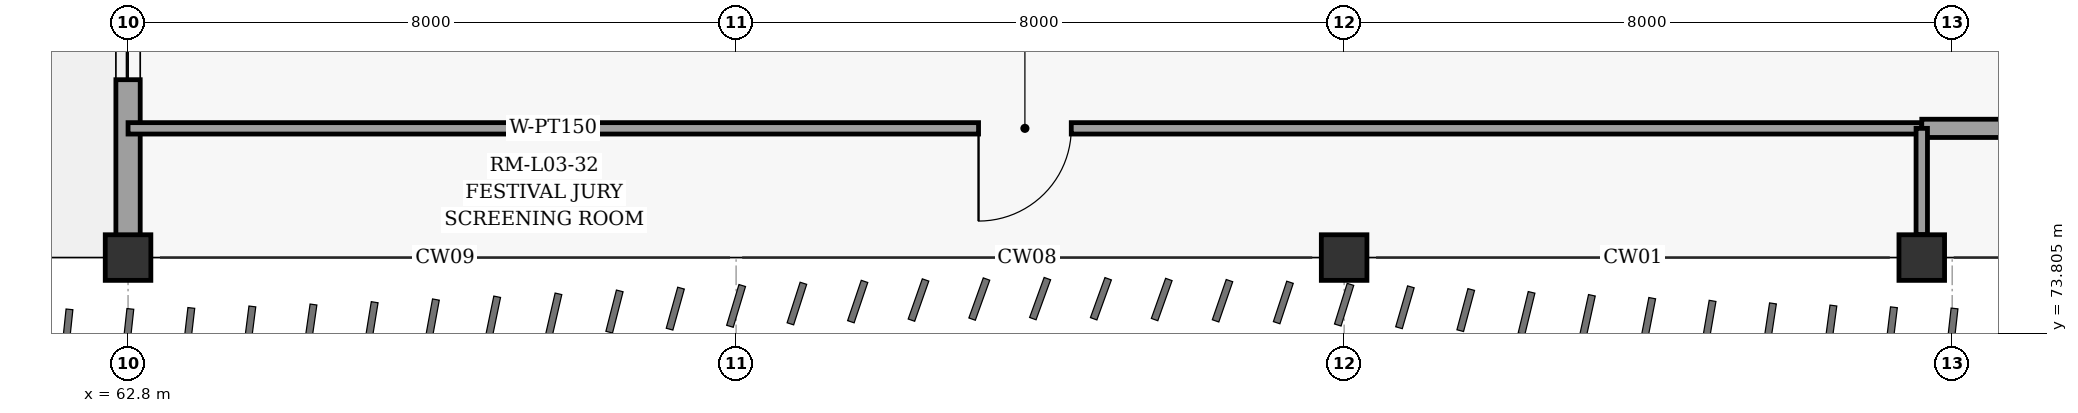
"""IFC4 building model, lengths in metres.
Left out: names, types, materials, properties, quantities, classifications, styles, units other than length and angle.
Written with IfcOpenShell. Run it as: python <this file> out.ifc"""

import sys

from ifc_helpers import new_model, si_unit, direction, frame, frame_2d, origin, origin_2d, place, context, subcontext, project, spatial, rectangle, extrude, element, fill, save


model = new_model("IFC4")
c1 = context("Model", 3, precision=1e-05, world=origin(), true_north=direction((0.0, 1.0)))
c2 = subcontext(c1, "Body", "Model", "MODEL_VIEW")
j1 = project(units=[si_unit("LENGTHUNIT", "METRE"), si_unit("PLANEANGLEUNIT", "RADIAN")], contexts=[c1])
p1 = place(None, origin())
s1 = spatial("IfcSite", under=j1, at=p1, CompositionType="ELEMENT")
p2 = place(p1, origin())
s2 = spatial("IfcBuilding", under=s1, at=p2, CompositionType="ELEMENT")
p3 = place(p2, frame((0.0, 0.0, 15.6)))
s3 = spatial("IfcBuildingStorey", under=s2, at=p3, CompositionType="ELEMENT", Elevation=15.6)
for number, where, z_axis, x_axis in (
    (1, (62.8, 74.8, 0.0), (0.0, 0.0, 1.0), (1.0, 0.0, 0.0)),
    (2, (78.8, 74.8, 0.0), (0.0, 0.0, 1.0), (1.0, 0.0, 0.0)),
    (3, (86.4, 74.8, 0.0), (0.0, 0.0, 1.0), (1.0, 0.0, 0.0)),
):
    element("IfcColumn", number, at=place(p3, frame(where, z_axis=z_axis, x_axis=x_axis)), inside=s3, PredefinedType="COLUMN", context=c2, shape_type="SweptSolid", body=[
        extrude(rectangle(XDim=0.6, YDim=0.6, at=origin_2d()), origin(), (0.0, 0.0, 1.0), 4.8),
    ])
p4 = place(p3, frame((62.8, 74.94, 0.0), z_axis=(0.0, 0.0, 1.0), x_axis=(0.0, 1.0, 0.0)))
e4 = element("IfcWall", 4, at=p4, inside=s3, PredefinedType="SOLIDWALL", context=c2, shape_type="SweptSolid", body=[
    extrude(rectangle(XDim=12.52, YDim=0.32, at=frame_2d((6.26, 0.0))), origin(), (0.0, 0.0, 1.0), 3.73),
])
p5 = place(p4, frame((2.2, 0.0, 0.8)))
e5 = element("IfcOpeningElement", 5, at=p5, cuts=e4, PredefinedType="OPENING", context=c2, shape_type="SweptSolid", body=[
    extrude(rectangle(XDim=1.7, YDim=2.15, at=frame_2d((0.85, 1.075))), frame((0.0, 0.17, 0.0), z_axis=(0.0, -1.0, 0.0), x_axis=(1.0, 0.0, 0.0)), (0.0, 0.0, 1.0), 0.34),
])
p6 = place(p3, frame((86.4, 76.5, 0.0), z_axis=(0.0, 0.0, 1.0), x_axis=(-1.0, 0.0, 0.0)))
e6 = element("IfcWall", 6, at=p6, inside=s3, PredefinedType="PARTITIONING", context=c2, shape_type="SweptSolid", body=[
    extrude(rectangle(XDim=23.6, YDim=0.15, at=frame_2d((11.8, 0.0))), origin(), (0.0, 0.0, 1.0), 4.58),
])
p7 = place(p6, frame((11.19, 0.0, 0.0)))
e7 = element("IfcOpeningElement", 7, at=p7, cuts=e6, PredefinedType="OPENING", context=c2, shape_type="SweptSolid", body=[
    extrude(rectangle(XDim=1.22, YDim=2.2, at=frame_2d((0.61, 1.1))), frame((0.0, 0.085, 0.0), z_axis=(0.0, -1.0, 0.0), x_axis=(1.0, 0.0, 0.0)), (0.0, 0.0, 1.0), 0.17),
])
p8 = place(p3, frame((126.8, 76.5, 0.0), z_axis=(0.0, 0.0, 1.0), x_axis=(-1.0, 0.0, 0.0)))
e8 = element("IfcWall", 8, at=p8, inside=s3, PredefinedType="PARTITIONING", context=c2, shape_type="SweptSolid", body=[
    extrude(rectangle(XDim=40.4, YDim=0.24, at=frame_2d((20.2, 0.0))), origin(), (0.0, 0.0, 1.0), 4.58),
])
p9 = place(p8, frame((19.57, 0.0, 0.0)))
e9 = element("IfcOpeningElement", 9, at=p9, cuts=e8, PredefinedType="OPENING", context=c2, shape_type="SweptSolid", body=[
    extrude(rectangle(XDim=1.26, YDim=2.2, at=frame_2d((0.63, 1.1))), frame((0.0, 0.13, 0.0), z_axis=(0.0, -1.0, 0.0), x_axis=(1.0, 0.0, 0.0)), (0.0, 0.0, 1.0), 0.26),
])
p10 = place(p3, frame((86.4, 76.5, 0.0), z_axis=(0.0, 0.0, 1.0), x_axis=(0.0, -1.0, 0.0)))
e10 = element("IfcWall", 10, at=p10, inside=s3, PredefinedType="PARTITIONING", context=c2, shape_type="SweptSolid", body=[
    extrude(rectangle(XDim=1.398, YDim=0.15, at=frame_2d((0.699, 0.0))), origin(), (0.0, 0.0, 1.0), 3.83),
])
p11 = place(p5, origin())
e11 = element("IfcWindow", 11, at=p11, inside=s3, PartitioningType="SINGLE_PANEL", PredefinedType="WINDOW", context=c2, shape_type="SweptSolid", body=[
    extrude(rectangle(XDim=1.7, YDim=2.15, at=frame_2d((0.85, 1.075))), frame((0.0, 0.03, 0.0), z_axis=(0.0, -1.0, 0.0), x_axis=(1.0, 0.0, 0.0)), (0.0, 0.0, 1.0), 0.06),
])
fill(e5, e11)
p12 = place(p7, origin())
e12 = element("IfcDoor", 12, at=p12, inside=s3, OperationType="SINGLE_SWING_RIGHT", PredefinedType="DOOR", context=c2, shape_type="SweptSolid", body=[
    extrude(rectangle(XDim=1.22, YDim=2.2, at=frame_2d((0.61, 1.1))), frame((0.0, 0.025, 0.0), z_axis=(0.0, -1.0, 0.0), x_axis=(1.0, 0.0, 0.0)), (0.0, 0.0, 1.0), 0.05),
])
fill(e7, e12)
save(model, sys.argv[1])
